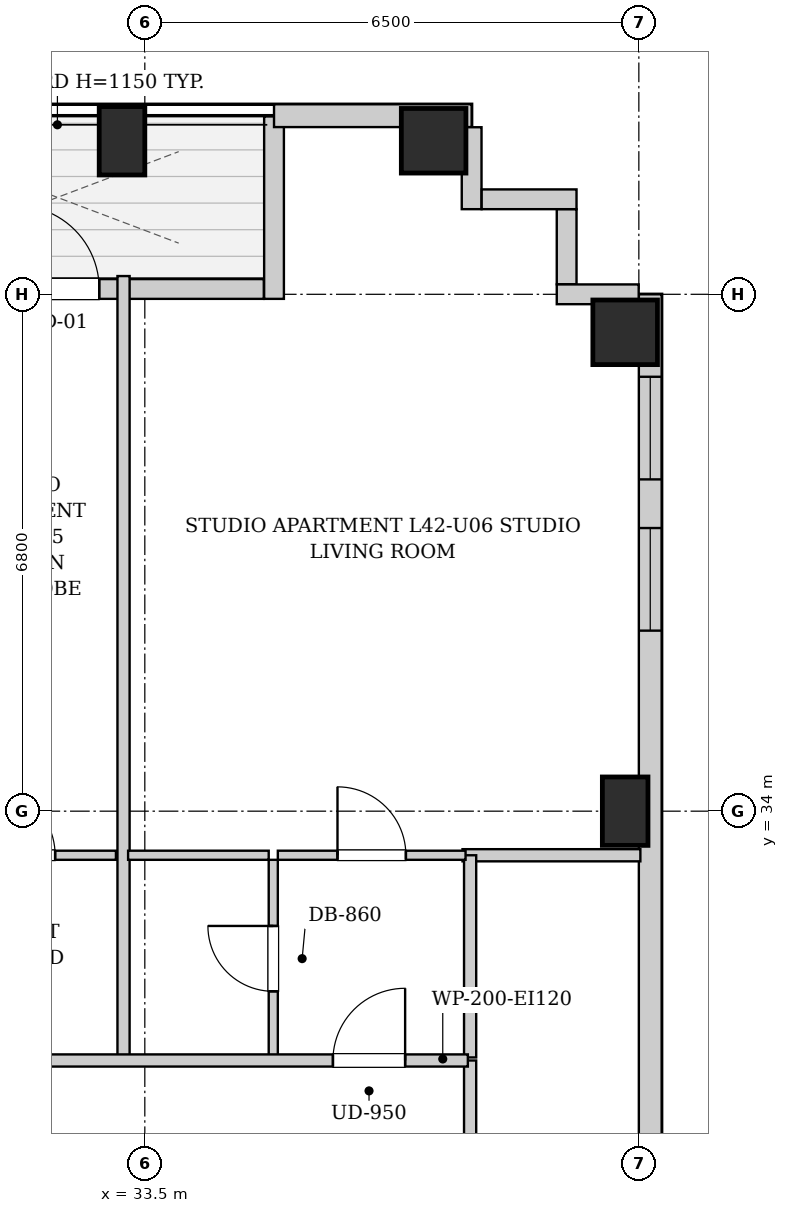
"""IFC4 building model, lengths in metres.
Left out: names, types, materials, properties, quantities, classifications, styles, units other than length and angle.
Written with IfcOpenShell. Run it as: python <this file> out.ifc"""

import sys

from ifc_helpers import new_model, si_unit, direction, frame, frame_2d, origin, origin_2d, place, context, subcontext, project, spatial, rectangle, extrude, element, fill, save


model = new_model("IFC4")
c1 = context("Model", 3, precision=1e-05, world=origin(), true_north=direction((0.0, 1.0)))
c2 = subcontext(c1, "Body", "Model", "MODEL_VIEW")
j1 = project(units=[si_unit("LENGTHUNIT", "METRE"), si_unit("PLANEANGLEUNIT", "RADIAN")], contexts=[c1])
p1 = place(None, origin())
s1 = spatial("IfcSite", under=j1, at=p1, CompositionType="ELEMENT")
p2 = place(p1, origin())
s2 = spatial("IfcBuilding", under=s1, at=p2, CompositionType="ELEMENT")
p3 = place(p2, frame((0.0, 0.0, 147.15)))
s3 = spatial("IfcBuildingStorey", under=s2, at=p3, CompositionType="ELEMENT", Elevation=147.15)
p4 = place(p3, frame((33.2, 42.82, 0.0), z_axis=(0.0, 0.0, 1.0), x_axis=(1.0, 0.0, 0.0)))
e1 = element("IfcColumn", 1, at=p4, inside=s3, PredefinedType="COLUMN", context=c2, shape_type="SweptSolid", body=[
    extrude(rectangle(XDim=0.6, YDim=0.9, at=origin_2d()), origin(), (0.0, 0.0, 1.0), 3.25),
])
p5 = place(p3, frame((37.3, 42.82, 0.0), z_axis=(0.0, 0.0, 1.0), x_axis=(1.0, 0.0, 0.0)))
e2 = element("IfcColumn", 2, at=p5, inside=s3, PredefinedType="COLUMN", context=c2, shape_type="SweptSolid", body=[
    extrude(rectangle(XDim=0.85, YDim=0.85, at=origin_2d()), origin(), (0.0, 0.0, 1.0), 3.25),
])
p6 = place(p3, frame((39.82, 34.0, 0.0), z_axis=(0.0, 0.0, 1.0), x_axis=(1.0, 0.0, 0.0)))
e3 = element("IfcColumn", 3, at=p6, inside=s3, PredefinedType="COLUMN", context=c2, shape_type="SweptSolid", body=[
    extrude(rectangle(XDim=0.6, YDim=0.9, at=origin_2d()), origin(), (0.0, 0.0, 1.0), 3.25),
])
p7 = place(p3, frame((39.82, 40.3, 0.0), z_axis=(0.0, 0.0, 1.0), x_axis=(1.0, 0.0, 0.0)))
e4 = element("IfcColumn", 4, at=p7, inside=s3, PredefinedType="COLUMN", context=c2, shape_type="SweptSolid", body=[
    extrude(rectangle(XDim=0.85, YDim=0.85, at=origin_2d()), origin(), (0.0, 0.0, 1.0), 3.25),
])
p8 = place(p3, frame((29.634, 40.87, 0.0), z_axis=(0.0, 0.0, 1.0), x_axis=(1.0, 0.0, 0.0)))
e5 = element("IfcWall", 5, at=p8, inside=s3, PredefinedType="SOLIDWALL", context=c2, shape_type="SweptSolid", body=[
    extrude(rectangle(XDim=5.432, YDim=0.26, at=frame_2d((2.716, 0.0))), origin(), (0.0, 0.0, 1.0), 2.99),
])
p9 = place(p8, frame((2.166, 0.0, 0.0)))
e6 = element("IfcOpeningElement", 6, at=p9, cuts=e5, PredefinedType="OPENING", context=c2, shape_type="SweptSolid", body=[
    extrude(rectangle(XDim=1.1, YDim=2.0, at=frame_2d((0.55, 1.0))), frame((0.0, 0.14, 0.0), z_axis=(0.0, -1.0, 0.0), x_axis=(1.0, 0.0, 0.0)), (0.0, 0.0, 1.0), 0.28),
])
p10 = place(p8, frame((1.156, 0.0, 0.55)))
e7 = element("IfcOpeningElement", 7, at=p10, cuts=e5, PredefinedType="OPENING", context=c2, shape_type="SweptSolid", body=[
    extrude(rectangle(XDim=0.85, YDim=1.2, at=frame_2d((0.425, 0.6))), frame((0.0, 0.14, 0.0), z_axis=(0.0, -1.0, 0.0), x_axis=(1.0, 0.0, 0.0)), (0.0, 0.0, 1.0), 0.28),
])
p11 = place(p3, frame((35.2, 40.74, 0.0), z_axis=(0.0, 0.0, 1.0), x_axis=(0.0, 1.0, 0.0)))
e8 = element("IfcWall", 8, at=p11, inside=s3, PredefinedType="SOLIDWALL", context=c2, shape_type="SweptSolid", body=[
    extrude(rectangle(XDim=2.4, YDim=0.26, at=frame_2d((1.2, 0.0))), origin(), (0.0, 0.0, 1.0), 2.99),
])
p12 = place(p3, frame((35.2, 43.15, 0.0), z_axis=(0.0, 0.0, 1.0), x_axis=(1.0, 0.0, 0.0)))
e9 = element("IfcWall", 9, at=p12, inside=s3, PredefinedType="SOLIDWALL", context=c2, shape_type="SweptSolid", body=[
    extrude(rectangle(XDim=2.6, YDim=0.3, at=frame_2d((1.3, 0.0))), origin(), (0.0, 0.0, 1.0), 2.99),
])
p13 = place(p3, frame((40.15, 40.8, 0.0), z_axis=(0.0, 0.0, 1.0), x_axis=(0.0, -1.0, 0.0)))
e10 = element("IfcWall", 10, at=p13, inside=s3, PredefinedType="SOLIDWALL", context=c2, shape_type="SweptSolid", body=[
    extrude(rectangle(XDim=34.5, YDim=0.3, at=frame_2d((17.25, 0.0))), origin(), (0.0, 0.0, 1.0), 2.99),
])
p14 = place(p13, frame((31.575, 0.0, 0.55)))
e11 = element("IfcOpeningElement", 11, at=p14, cuts=e10, PredefinedType="OPENING", context=c2, shape_type="SweptSolid", body=[
    extrude(rectangle(XDim=1.35, YDim=1.2, at=frame_2d((0.675, 0.6))), frame((0.0, 0.16, 0.0), z_axis=(0.0, -1.0, 0.0), x_axis=(1.0, 0.0, 0.0)), (0.0, 0.0, 1.0), 0.32),
])
p15 = place(p13, frame((3.075, 0.0, 0.55)))
e12 = element("IfcOpeningElement", 12, at=p15, cuts=e10, PredefinedType="OPENING", context=c2, shape_type="SweptSolid", body=[
    extrude(rectangle(XDim=1.35, YDim=1.2, at=frame_2d((0.675, 0.6))), frame((0.0, 0.16, 0.0), z_axis=(0.0, -1.0, 0.0), x_axis=(1.0, 0.0, 0.0)), (0.0, 0.0, 1.0), 0.32),
])
p16 = place(p13, frame((1.085, 0.0, 0.55)))
e13 = element("IfcOpeningElement", 13, at=p16, cuts=e10, PredefinedType="OPENING", context=c2, shape_type="SweptSolid", body=[
    extrude(rectangle(XDim=1.35, YDim=1.2, at=frame_2d((0.675, 0.6))), frame((0.0, 0.16, 0.0), z_axis=(0.0, -1.0, 0.0), x_axis=(1.0, 0.0, 0.0)), (0.0, 0.0, 1.0), 0.32),
])
p17 = place(p13, frame((22.8, 0.0, 0.55)))
e14 = element("IfcOpeningElement", 14, at=p17, cuts=e10, PredefinedType="OPENING", context=c2, shape_type="SweptSolid", body=[
    extrude(rectangle(XDim=1.35, YDim=1.2, at=frame_2d((0.675, 0.6))), frame((0.0, 0.16, 0.0), z_axis=(0.0, -1.0, 0.0), x_axis=(1.0, 0.0, 0.0)), (0.0, 0.0, 1.0), 0.32),
])
p18 = place(p13, frame((13.425, 0.0, 0.55)))
e15 = element("IfcOpeningElement", 15, at=p18, cuts=e10, PredefinedType="OPENING", context=c2, shape_type="SweptSolid", body=[
    extrude(rectangle(XDim=1.35, YDim=1.2, at=frame_2d((0.675, 0.6))), frame((0.0, 0.16, 0.0), z_axis=(0.0, -1.0, 0.0), x_axis=(1.0, 0.0, 0.0)), (0.0, 0.0, 1.0), 0.32),
])
p19 = place(p3, frame((37.8, 42.998, 0.0), z_axis=(0.0, 0.0, 1.0), x_axis=(0.0, -1.0, 0.0)))
e16 = element("IfcWall", 16, at=p19, inside=s3, PredefinedType="SOLIDWALL", context=c2, shape_type="SweptSolid", body=[
    extrude(rectangle(XDim=1.078, YDim=0.26, at=frame_2d((0.539, 0.0))), origin(), (0.0, 0.0, 1.0), 2.99),
])
p20 = place(p3, frame((37.932, 42.05, 0.0), z_axis=(0.0, 0.0, 1.0), x_axis=(1.0, 0.0, 0.0)))
e17 = element("IfcWall", 17, at=p20, inside=s3, PredefinedType="SOLIDWALL", context=c2, shape_type="SweptSolid", body=[
    extrude(rectangle(XDim=1.248, YDim=0.26, at=frame_2d((0.624, 0.0))), origin(), (0.0, 0.0, 1.0), 2.99),
])
p21 = place(p3, frame((39.05, 41.918, 0.0), z_axis=(0.0, 0.0, 1.0), x_axis=(0.0, -1.0, 0.0)))
e18 = element("IfcWall", 18, at=p21, inside=s3, PredefinedType="SOLIDWALL", context=c2, shape_type="SweptSolid", body=[
    extrude(rectangle(XDim=0.986, YDim=0.26, at=frame_2d((0.493, 0.0))), origin(), (0.0, 0.0, 1.0), 2.99),
])
p22 = place(p3, frame((38.92, 40.8, 0.0), z_axis=(0.0, 0.0, 1.0), x_axis=(1.0, 0.0, 0.0)))
e19 = element("IfcWall", 19, at=p22, inside=s3, PredefinedType="SOLIDWALL", context=c2, shape_type="SweptSolid", body=[
    extrude(rectangle(XDim=1.078, YDim=0.26, at=frame_2d((0.539, 0.0))), origin(), (0.0, 0.0, 1.0), 2.99),
])
p23 = place(p3, frame((37.78, 28.98, 0.0), z_axis=(0.0, 0.0, 1.0), x_axis=(0.0, 1.0, 0.0)))
e20 = element("IfcWall", 20, at=p23, inside=s3, PredefinedType="PARTITIONING", context=c2, shape_type="SweptSolid", body=[
    extrude(rectangle(XDim=1.74, YDim=0.16, at=frame_2d((0.87, 0.0))), origin(), (0.0, 0.0, 1.0), 2.99),
])
p24 = place(p3, frame((30.62, 33.42, 0.0), z_axis=(0.0, 0.0, 1.0), x_axis=(1.0, 0.0, 0.0)))
e21 = element("IfcWall", 21, at=p24, inside=s3, PredefinedType="PARTITIONING", context=c2, shape_type="SweptSolid", body=[
    extrude(rectangle(XDim=2.5, YDim=0.12, at=frame_2d((1.25, 0.0))), origin(), (0.0, 0.0, 1.0), 2.99),
])
p25 = place(p24, frame((0.8, 0.0, 0.0)))
e22 = element("IfcOpeningElement", 22, at=p25, cuts=e21, PredefinedType="OPENING", context=c2, shape_type="SweptSolid", body=[
    extrude(rectangle(XDim=0.9, YDim=2.05, at=frame_2d((0.45, 1.025))), frame((0.0, 0.07, 0.0), z_axis=(0.0, -1.0, 0.0), x_axis=(1.0, 0.0, 0.0)), (0.0, 0.0, 1.0), 0.14),
])
p26 = place(p3, frame((37.68, 33.42, 0.0), z_axis=(0.0, 0.0, 1.0), x_axis=(1.0, 0.0, 0.0)))
e23 = element("IfcWall", 23, at=p26, inside=s3, PredefinedType="PARTITIONING", context=c2, shape_type="SweptSolid", body=[
    extrude(rectangle(XDim=2.34, YDim=0.16, at=frame_2d((1.17, 0.0))), origin(), (0.0, 0.0, 1.0), 2.99),
])
p27 = place(p3, frame((37.78, 30.76, 0.0), z_axis=(0.0, 0.0, 1.0), x_axis=(0.0, 1.0, 0.0)))
e24 = element("IfcWall", 24, at=p27, inside=s3, PredefinedType="PARTITIONING", context=c2, shape_type="SweptSolid", body=[
    extrude(rectangle(XDim=2.66, YDim=0.16, at=frame_2d((1.33, 0.0))), origin(), (0.0, 0.0, 1.0), 2.99),
])
p28 = place(p3, frame((33.22, 30.76, 0.0), z_axis=(0.0, 0.0, 1.0), x_axis=(0.0, 1.0, 0.0)))
e25 = element("IfcWall", 25, at=p28, inside=s3, PredefinedType="PARTITIONING", context=c2, shape_type="SweptSolid", body=[
    extrude(rectangle(XDim=10.28, YDim=0.16, at=frame_2d((5.14, 0.0))), origin(), (0.0, 0.0, 1.0), 2.442),
])
p29 = place(p3, frame((35.19, 30.76, 0.0), z_axis=(0.0, 0.0, 1.0), x_axis=(0.0, 1.0, 0.0)))
e26 = element("IfcWall", 26, at=p29, inside=s3, PredefinedType="PARTITIONING", context=c2, shape_type="SweptSolid", body=[
    extrude(rectangle(XDim=2.6, YDim=0.12, at=frame_2d((1.3, 0.0))), origin(), (0.0, 0.0, 1.0), 2.99),
])
p30 = place(p29, frame((0.87, 0.0, 0.0)))
e27 = element("IfcOpeningElement", 27, at=p30, cuts=e26, PredefinedType="OPENING", context=c2, shape_type="SweptSolid", body=[
    extrude(rectangle(XDim=0.86, YDim=2.05, at=frame_2d((0.43, 1.025))), frame((0.0, 0.07, 0.0), z_axis=(0.0, -1.0, 0.0), x_axis=(1.0, 0.0, 0.0)), (0.0, 0.0, 1.0), 0.14),
])
p31 = place(p3, frame((33.28, 33.42, 0.0), z_axis=(0.0, 0.0, 1.0), x_axis=(1.0, 0.0, 0.0)))
e28 = element("IfcWall", 28, at=p31, inside=s3, PredefinedType="PARTITIONING", context=c2, shape_type="SweptSolid", body=[
    extrude(rectangle(XDim=1.85, YDim=0.12, at=frame_2d((0.925, 0.0))), origin(), (0.0, 0.0, 1.0), 2.99),
])
p32 = place(p3, frame((35.25, 33.42, 0.0), z_axis=(0.0, 0.0, 1.0), x_axis=(1.0, 0.0, 0.0)))
e29 = element("IfcWall", 29, at=p32, inside=s3, PredefinedType="PARTITIONING", context=c2, shape_type="SweptSolid", body=[
    extrude(rectangle(XDim=2.47, YDim=0.12, at=frame_2d((1.235, 0.0))), origin(), (0.0, 0.0, 1.0), 2.99),
])
p33 = place(p32, frame((0.785, 0.0, 0.0)))
e30 = element("IfcOpeningElement", 30, at=p33, cuts=e29, PredefinedType="OPENING", context=c2, shape_type="SweptSolid", body=[
    extrude(rectangle(XDim=0.9, YDim=2.05, at=frame_2d((0.45, 1.025))), frame((0.0, 0.07, 0.0), z_axis=(0.0, -1.0, 0.0), x_axis=(1.0, 0.0, 0.0)), (0.0, 0.0, 1.0), 0.14),
])
p34 = place(p3, frame((10.05, 30.72, 0.0), z_axis=(0.0, 0.0, 1.0), x_axis=(1.0, 0.0, 0.0)))
e31 = element("IfcWall", 31, at=p34, inside=s3, PredefinedType="PARTITIONING", context=c2, shape_type="SweptSolid", body=[
    extrude(rectangle(XDim=27.7, YDim=0.16, at=frame_2d((13.85, 0.0))), origin(), (0.0, 0.0, 1.0), 2.99),
])
p35 = place(p34, frame((4.063, 0.0, 0.0)))
e32 = element("IfcOpeningElement", 32, at=p35, cuts=e31, PredefinedType="OPENING", context=c2, shape_type="SweptSolid", body=[
    extrude(rectangle(XDim=0.95, YDim=2.1, at=frame_2d((0.475, 1.05))), frame((0.0, 0.09, 0.0), z_axis=(0.0, -1.0, 0.0), x_axis=(1.0, 0.0, 0.0)), (0.0, 0.0, 1.0), 0.18),
])
p36 = place(p34, frame((9.515, 0.0, 0.0)))
e33 = element("IfcOpeningElement", 33, at=p36, cuts=e31, PredefinedType="OPENING", context=c2, shape_type="SweptSolid", body=[
    extrude(rectangle(XDim=0.95, YDim=2.1, at=frame_2d((0.475, 1.05))), frame((0.0, 0.09, 0.0), z_axis=(0.0, -1.0, 0.0), x_axis=(1.0, 0.0, 0.0)), (0.0, 0.0, 1.0), 0.18),
])
p37 = place(p34, frame((15.896, 0.0, 0.0)))
e34 = element("IfcOpeningElement", 34, at=p37, cuts=e31, PredefinedType="OPENING", context=c2, shape_type="SweptSolid", body=[
    extrude(rectangle(XDim=0.95, YDim=2.1, at=frame_2d((0.475, 1.05))), frame((0.0, 0.09, 0.0), z_axis=(0.0, -1.0, 0.0), x_axis=(1.0, 0.0, 0.0)), (0.0, 0.0, 1.0), 0.18),
])
p38 = place(p34, frame((25.925, 0.0, 0.0)))
e35 = element("IfcOpeningElement", 35, at=p38, cuts=e31, PredefinedType="OPENING", context=c2, shape_type="SweptSolid", body=[
    extrude(rectangle(XDim=0.95, YDim=2.1, at=frame_2d((0.475, 1.05))), frame((0.0, 0.09, 0.0), z_axis=(0.0, -1.0, 0.0), x_axis=(1.0, 0.0, 0.0)), (0.0, 0.0, 1.0), 0.18),
])
p39 = place(p25, origin())
e36 = element("IfcDoor", 36, at=p39, inside=s3, OperationType="SINGLE_SWING_LEFT", PredefinedType="DOOR", context=c2, shape_type="SweptSolid", body=[
    extrude(rectangle(XDim=0.9, YDim=2.05, at=frame_2d((0.45, 1.025))), frame((0.0, 0.025, 0.0), z_axis=(0.0, -1.0, 0.0), x_axis=(1.0, 0.0, 0.0)), (0.0, 0.0, 1.0), 0.05),
])
fill(e22, e36)
p40 = place(p30, origin())
e37 = element("IfcDoor", 37, at=p40, inside=s3, OperationType="SINGLE_SWING_RIGHT", PredefinedType="DOOR", context=c2, shape_type="SweptSolid", body=[
    extrude(rectangle(XDim=0.86, YDim=2.05, at=frame_2d((0.43, 1.025))), frame((0.0, 0.025, 0.0), z_axis=(0.0, -1.0, 0.0), x_axis=(1.0, 0.0, 0.0)), (0.0, 0.0, 1.0), 0.05),
])
fill(e27, e37)
p41 = place(p33, origin())
e38 = element("IfcDoor", 38, at=p41, inside=s3, OperationType="SINGLE_SWING_LEFT", PredefinedType="DOOR", context=c2, shape_type="SweptSolid", body=[
    extrude(rectangle(XDim=0.9, YDim=2.05, at=frame_2d((0.45, 1.025))), frame((0.0, 0.025, 0.0), z_axis=(0.0, -1.0, 0.0), x_axis=(1.0, 0.0, 0.0)), (0.0, 0.0, 1.0), 0.05),
])
fill(e30, e38)
p42 = place(p38, origin())
e39 = element("IfcDoor", 39, at=p42, inside=s3, OperationType="SINGLE_SWING_RIGHT", PredefinedType="DOOR", context=c2, shape_type="SweptSolid", body=[
    extrude(rectangle(XDim=0.95, YDim=2.1, at=frame_2d((0.475, 1.05))), frame((0.0, 0.025, 0.0), z_axis=(0.0, -1.0, 0.0), x_axis=(1.0, 0.0, 0.0)), (0.0, 0.0, 1.0), 0.05),
])
fill(e35, e39)
p43 = place(p9, origin())
e40 = element("IfcDoor", 40, at=p43, inside=s3, OperationType="SINGLE_SWING_LEFT", PredefinedType="DOOR", context=c2, shape_type="SweptSolid", body=[
    extrude(rectangle(XDim=1.1, YDim=2.0, at=frame_2d((0.55, 1.0))), frame((0.0, 0.025, 0.0), z_axis=(0.0, -1.0, 0.0), x_axis=(1.0, 0.0, 0.0)), (0.0, 0.0, 1.0), 0.05),
])
fill(e6, e40)
p44 = place(p15, origin())
e41 = element("IfcWindow", 41, at=p44, inside=s3, PartitioningType="SINGLE_PANEL", PredefinedType="WINDOW", context=c2, shape_type="SweptSolid", body=[
    extrude(rectangle(XDim=1.35, YDim=1.2, at=frame_2d((0.675, 0.6))), frame((0.0, 0.03, 0.0), z_axis=(0.0, -1.0, 0.0), x_axis=(1.0, 0.0, 0.0)), (0.0, 0.0, 1.0), 0.06),
])
fill(e12, e41)
p45 = place(p16, origin())
e42 = element("IfcWindow", 42, at=p45, inside=s3, PartitioningType="SINGLE_PANEL", PredefinedType="WINDOW", context=c2, shape_type="SweptSolid", body=[
    extrude(rectangle(XDim=1.35, YDim=1.2, at=frame_2d((0.675, 0.6))), frame((0.0, 0.03, 0.0), z_axis=(0.0, -1.0, 0.0), x_axis=(1.0, 0.0, 0.0)), (0.0, 0.0, 1.0), 0.06),
])
fill(e13, e42)
save(model, sys.argv[1])
